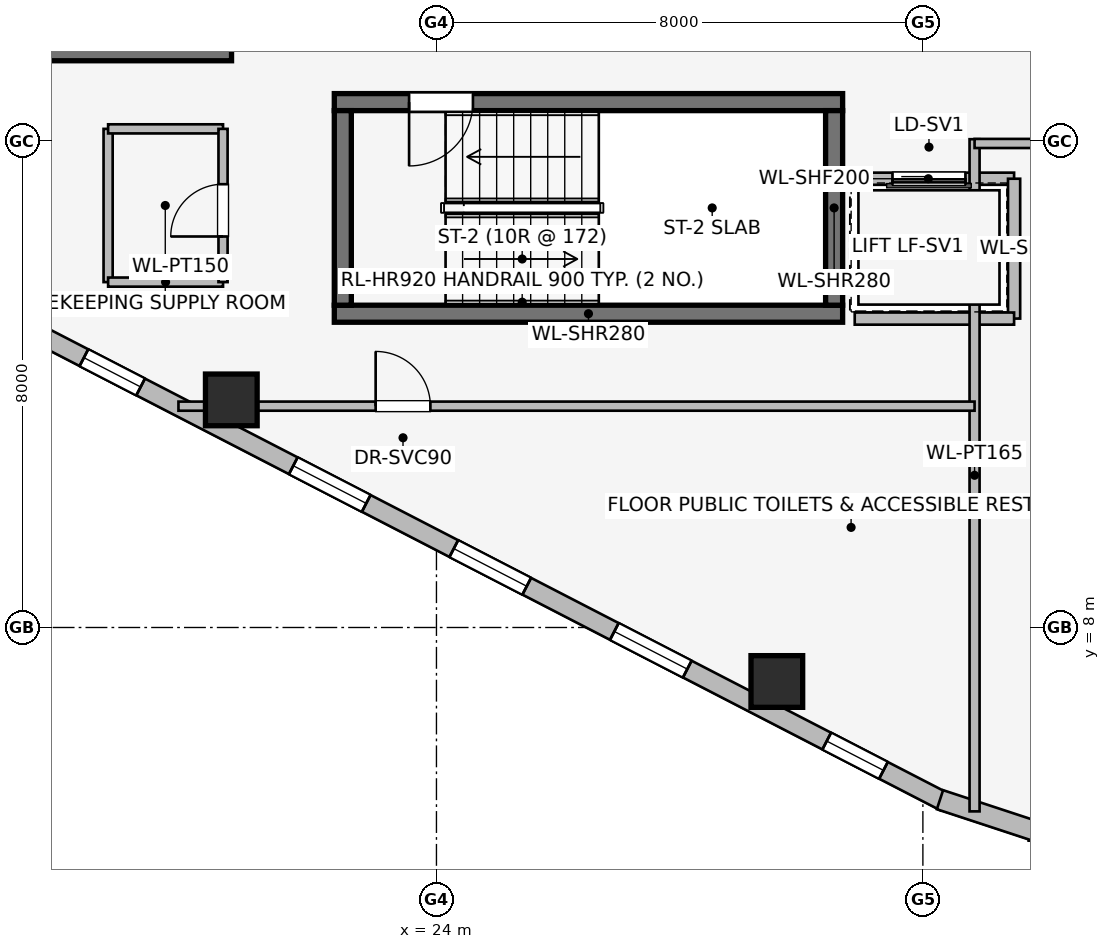
"""IFC4 building model, lengths in metres.
Left out: names, types, materials, properties, quantities, classifications, styles, units other than length and angle.
Written with IfcOpenShell. Run it as: python <this file> out.ifc"""

import sys

from ifc_helpers import new_model, si_unit, direction, frame, frame_2d, origin, origin_2d, place, context, subcontext, project, spatial, rectangle, extrude, element, fill, save


model = new_model("IFC4")
c1 = context("Model", 3, precision=1e-05, world=origin(), true_north=direction((0.0, 1.0)))
c2 = subcontext(c1, "Body", "Model", "MODEL_VIEW")
j1 = project(units=[si_unit("LENGTHUNIT", "METRE"), si_unit("PLANEANGLEUNIT", "RADIAN")], contexts=[c1])
p1 = place(None, origin())
s1 = spatial("IfcSite", under=j1, at=p1, CompositionType="ELEMENT")
p2 = place(p1, origin())
s2 = spatial("IfcBuilding", under=s1, at=p2, CompositionType="ELEMENT")
p3 = place(p2, frame((0.0, 0.0, 170.55)))
s3 = spatial("IfcBuildingStorey", under=s2, at=p3, CompositionType="ELEMENT", Elevation=170.55)
p4 = place(p3, frame((16.87, 17.46, 0.0), z_axis=(0.0, 0.0, 1.0), x_axis=(1.0, 0.0, 0.0)))
e1 = element("IfcWall", 1, at=p4, inside=s3, PredefinedType="SHEAR", context=c2, shape_type="SweptSolid", body=[
    extrude(rectangle(XDim=3.76, YDim=0.28, at=frame_2d((1.88, 0.0))), origin(), (0.0, 0.0, 1.0), 3.45),
])
p5 = place(p3, frame((22.32, 13.16, 0.0), z_axis=(0.0, 0.0, 1.0), x_axis=(1.0, 0.0, 0.0)))
e2 = element("IfcWall", 2, at=p5, inside=s3, PredefinedType="SHEAR", context=c2, shape_type="SweptSolid", body=[
    extrude(rectangle(XDim=8.36, YDim=0.28, at=frame_2d((4.18, 0.0))), origin(), (0.0, 0.0, 1.0), 3.45),
])
p6 = place(p3, frame((30.68, 16.64, 0.0), z_axis=(0.0, 0.0, 1.0), x_axis=(-1.0, 0.0, 0.0)))
e3 = element("IfcWall", 3, at=p6, inside=s3, PredefinedType="SHEAR", context=c2, shape_type="SweptSolid", body=[
    extrude(rectangle(XDim=8.36, YDim=0.28, at=frame_2d((4.18, 0.0))), origin(), (0.0, 0.0, 1.0), 3.45),
])
p7 = place(p6, frame((6.08, 0.0, 0.0)))
e4 = element("IfcOpeningElement", 4, at=p7, cuts=e3, PredefinedType="OPENING", context=c2, shape_type="SweptSolid", body=[
    extrude(rectangle(XDim=1.05, YDim=2.0, at=frame_2d((0.525, 1.0))), frame((0.0, 0.15, 0.0), z_axis=(0.0, -1.0, 0.0), x_axis=(1.0, 0.0, 0.0)), (0.0, 0.0, 1.0), 0.3),
])
for number, where, z_axis, x_axis in (
    (5, (22.46, 16.5, 0.0), (0.0, 0.0, 1.0), (0.0, -1.0, 0.0)),
    (6, (30.54, 13.3, 0.0), (0.0, 0.0, 1.0), (0.0, 1.0, 0.0)),
):
    element("IfcWall", number, at=place(p3, frame(where, z_axis=z_axis, x_axis=x_axis)), inside=s3, PredefinedType="SHEAR", context=c2, shape_type="SweptSolid", body=[
        extrude(rectangle(XDim=3.2, YDim=0.28, at=frame_2d((1.6, 0.0))), origin(), (0.0, 0.0, 1.0), 3.45),
    ])
for number, where, z_axis, x_axis in (
    (7, (20.626, 11.743, 0.0), (0.0, 0.0, 1.0), (1.0, 0.0, 0.0)),
    (8, (29.598, 7.112, 0.0), (0.0, 0.0, 1.0), (1.0, 0.0, 0.0)),
):
    element("IfcColumn", number, at=place(p3, frame(where, z_axis=z_axis, x_axis=x_axis)), inside=s3, PredefinedType="COLUMN", context=c2, shape_type="SweptSolid", body=[
        extrude(rectangle(XDim=0.85, YDim=0.85, at=origin_2d()), origin(), (0.0, 0.0, 1.0), 3.45),
    ])
p8 = place(p3, frame((32.362, 5.129, 0.0), z_axis=(0.0, 0.0, 1.0), x_axis=(-0.888626188278, 0.458632202867, 0.0)))
e9 = element("IfcWall", 9, at=p8, inside=s3, PredefinedType="STANDARD", context=c2, shape_type="SweptSolid", body=[
    extrude(rectangle(XDim=16.828, YDim=0.31, at=frame_2d((8.414, 0.0))), origin(), (0.0, 0.0, 1.0), 3.16),
])
p9 = place(p8, frame((1.137, 0.0, 0.75)))
e10 = element("IfcOpeningElement", 10, at=p9, cuts=e9, PredefinedType="OPENING", context=c2, shape_type="SweptSolid", body=[
    extrude(rectangle(XDim=1.05, YDim=1.4, at=frame_2d((0.525, 0.7))), frame((0.0, 0.165, 0.0), z_axis=(0.0, -1.0, 0.0), x_axis=(1.0, 0.0, 0.0)), (0.0, 0.0, 1.0), 0.33),
])
p10 = place(p8, frame((4.768, 0.0, 0.75)))
e11 = element("IfcOpeningElement", 11, at=p10, cuts=e9, PredefinedType="OPENING", context=c2, shape_type="SweptSolid", body=[
    extrude(rectangle(XDim=1.35, YDim=1.45, at=frame_2d((0.675, 0.725))), frame((0.0, 0.165, 0.0), z_axis=(0.0, -1.0, 0.0), x_axis=(1.0, 0.0, 0.0)), (0.0, 0.0, 1.0), 0.33),
])
p11 = place(p8, frame((7.739, 0.0, 0.75)))
e12 = element("IfcOpeningElement", 12, at=p11, cuts=e9, PredefinedType="OPENING", context=c2, shape_type="SweptSolid", body=[
    extrude(rectangle(XDim=1.35, YDim=1.45, at=frame_2d((0.675, 0.725))), frame((0.0, 0.165, 0.0), z_axis=(0.0, -1.0, 0.0), x_axis=(1.0, 0.0, 0.0)), (0.0, 0.0, 1.0), 0.33),
])
p12 = place(p8, frame((10.71, 0.0, 0.75)))
e13 = element("IfcOpeningElement", 13, at=p12, cuts=e9, PredefinedType="OPENING", context=c2, shape_type="SweptSolid", body=[
    extrude(rectangle(XDim=1.35, YDim=1.45, at=frame_2d((0.675, 0.725))), frame((0.0, 0.165, 0.0), z_axis=(0.0, -1.0, 0.0), x_axis=(1.0, 0.0, 0.0)), (0.0, 0.0, 1.0), 0.33),
])
p13 = place(p8, frame((14.885, 0.0, 0.75)))
e14 = element("IfcOpeningElement", 14, at=p13, cuts=e9, PredefinedType="OPENING", context=c2, shape_type="SweptSolid", body=[
    extrude(rectangle(XDim=1.05, YDim=1.4, at=frame_2d((0.525, 0.7))), frame((0.0, 0.165, 0.0), z_axis=(0.0, -1.0, 0.0), x_axis=(1.0, 0.0, 0.0)), (0.0, 0.0, 1.0), 0.33),
])
p14 = place(p3, frame((35.461, 4.659, 0.0), z_axis=(0.0, 0.0, 1.0), x_axis=(-1.0, 0.0, 0.0)))
e15 = element("IfcWall", 15, at=p14, inside=s3, PredefinedType="STANDARD", context=c2, shape_type="SweptSolid", body=[
    extrude(rectangle(XDim=1.722, YDim=0.33, at=frame_2d((0.861, 0.0))), origin(), (0.0, 0.0, 1.0), 3.16),
])
p15 = place(p3, frame((33.917, 4.63, 0.0), z_axis=(0.0, 0.0, 1.0), x_axis=(-0.949937416267, 0.312440242569, 0.0)))
e16 = element("IfcWall", 16, at=p15, inside=s3, PredefinedType="STANDARD", context=c2, shape_type="SweptSolid", body=[
    extrude(rectangle(XDim=1.722, YDim=0.33, at=frame_2d((0.861, 0.0))), origin(), (0.0, 0.0, 1.0), 3.16),
])
p16 = place(p3, frame((33.5, 15.38, 0.0), z_axis=(0.0, 0.0, 1.0), x_axis=(-1.0, 0.0, 0.0)))
e17 = element("IfcWall", 17, at=p16, inside=s3, PredefinedType="PARTITIONING", context=c2, shape_type="SweptSolid", body=[
    extrude(rectangle(XDim=2.82, YDim=0.2, at=frame_2d((1.41, 0.0))), origin(), (0.0, 0.0, 1.0), 3.16),
])
p17 = place(p16, frame((0.8, 0.0, 0.0)))
e18 = element("IfcOpeningElement", 18, at=p17, cuts=e17, PredefinedType="OPENING", context=c2, shape_type="SweptSolid", body=[
    extrude(rectangle(XDim=1.2, YDim=2.2, at=frame_2d((0.6, 1.1))), frame((0.0, 0.11, 0.0), z_axis=(0.0, -1.0, 0.0), x_axis=(1.0, 0.0, 0.0)), (0.0, 0.0, 1.0), 0.22),
])
p18 = place(p3, frame((33.5, 13.08, 0.0), z_axis=(0.0, 0.0, 1.0), x_axis=(0.0, 1.0, 0.0)))
e19 = element("IfcWall", 19, at=p18, inside=s3, PredefinedType="PARTITIONING", context=c2, shape_type="SweptSolid", body=[
    extrude(rectangle(XDim=2.3, YDim=0.2, at=frame_2d((1.15, 0.0))), origin(), (0.0, 0.0, 1.0), 3.16),
])
p19 = place(p3, frame((30.879, 13.08, 0.0), z_axis=(0.0, 0.0, 1.0), x_axis=(1.0, 0.0, 0.0)))
e20 = element("IfcWall", 20, at=p19, inside=s3, PredefinedType="PARTITIONING", context=c2, shape_type="SweptSolid", body=[
    extrude(rectangle(XDim=2.621, YDim=0.2, at=frame_2d((1.311, 0.0))), origin(), (0.0, 0.0, 1.0), 3.16),
])
p20 = place(p3, frame((18.6, 16.2, 0.0), z_axis=(0.0, 0.0, 1.0), x_axis=(0.0, -1.0, 0.0)))
e21 = element("IfcWall", 21, at=p20, inside=s3, PredefinedType="PARTITIONING", context=c2, shape_type="SweptSolid", body=[
    extrude(rectangle(XDim=2.52, YDim=0.15, at=frame_2d((1.26, 0.0))), origin(), (0.0, 0.0, 1.0), 3.16),
])
for number, where, z_axis, x_axis in (
    (22, (18.6, 13.68, 0.0), (0.0, 0.0, 1.0), (1.0, 0.0, 0.0)),
    (23, (18.6, 16.2, 0.0), (0.0, 0.0, 1.0), (1.0, 0.0, 0.0)),
):
    element("IfcWall", number, at=place(p3, frame(where, z_axis=z_axis, x_axis=x_axis)), inside=s3, PredefinedType="PARTITIONING", context=c2, shape_type="SweptSolid", body=[
        extrude(rectangle(XDim=1.89, YDim=0.15, at=frame_2d((0.945, 0.0))), origin(), (0.0, 0.0, 1.0), 3.16),
    ])
p21 = place(p3, frame((20.49, 13.68, 0.0), z_axis=(0.0, 0.0, 1.0), x_axis=(0.0, 1.0, 0.0)))
e24 = element("IfcWall", 24, at=p21, inside=s3, PredefinedType="PARTITIONING", context=c2, shape_type="SweptSolid", body=[
    extrude(rectangle(XDim=2.52, YDim=0.15, at=frame_2d((1.26, 0.0))), origin(), (0.0, 0.0, 1.0), 3.16),
])
p22 = place(p21, frame((0.75, 0.0, 0.0)))
e25 = element("IfcOpeningElement", 25, at=p22, cuts=e24, PredefinedType="OPENING", context=c2, shape_type="SweptSolid", body=[
    extrude(rectangle(XDim=0.86, YDim=2.0, at=frame_2d((0.43, 1.0))), frame((0.0, 0.085, 0.0), z_axis=(0.0, -1.0, 0.0), x_axis=(1.0, 0.0, 0.0)), (0.0, 0.0, 1.0), 0.17),
])
p23 = place(p3, frame((32.85, 4.976, 0.0), z_axis=(0.0, 0.0, 1.0), x_axis=(0.0, 1.0, 0.0)))
e26 = element("IfcWall", 26, at=p23, inside=s3, PredefinedType="PARTITIONING", context=c2, shape_type="SweptSolid", body=[
    extrude(rectangle(XDim=11.054, YDim=0.165, at=frame_2d((5.527, 0.0))), origin(), (0.0, 0.0, 1.0), 3.16),
])
p24 = place(p3, frame((19.757, 11.64, 0.0), z_axis=(0.0, 0.0, 1.0), x_axis=(1.0, 0.0, 0.0)))
e27 = element("IfcWall", 27, at=p24, inside=s3, PredefinedType="PARTITIONING", context=c2, shape_type="SweptSolid", body=[
    extrude(rectangle(XDim=13.093, YDim=0.15, at=frame_2d((6.546, 0.0))), origin(), (0.0, 0.0, 1.0), 3.16),
])
p25 = place(p24, frame((3.243, 0.0, 0.0)))
e28 = element("IfcOpeningElement", 28, at=p25, cuts=e27, PredefinedType="OPENING", context=c2, shape_type="SweptSolid", body=[
    extrude(rectangle(XDim=0.9, YDim=2.0, at=frame_2d((0.45, 1.0))), frame((0.0, 0.085, 0.0), z_axis=(0.0, -1.0, 0.0), x_axis=(1.0, 0.0, 0.0)), (0.0, 0.0, 1.0), 0.17),
])
p26 = place(p3, frame((32.85, 15.96, 0.0), z_axis=(0.0, 0.0, 1.0), x_axis=(1.0, 0.0, 0.0)))
e29 = element("IfcWall", 29, at=p26, inside=s3, PredefinedType="PARTITIONING", context=c2, shape_type="SweptSolid", body=[
    extrude(rectangle(XDim=4.664, YDim=0.15, at=frame_2d((2.332, 0.0))), origin(), (0.0, 0.0, 1.0), 3.16),
])
p27 = place(p26, frame((1.852, 0.0, 0.0)))
e30 = element("IfcOpeningElement", 30, at=p27, cuts=e29, PredefinedType="OPENING", context=c2, shape_type="SweptSolid", body=[
    extrude(rectangle(XDim=0.96, YDim=2.0, at=frame_2d((0.48, 1.0))), frame((0.0, 0.085, 0.0), z_axis=(0.0, -1.0, 0.0), x_axis=(1.0, 0.0, 0.0)), (0.0, 0.0, 1.0), 0.17),
])
p28 = place(p9, origin())
e31 = element("IfcWindow", 31, at=p28, inside=s3, PartitioningType="SINGLE_PANEL", PredefinedType="WINDOW", context=c2, shape_type="SweptSolid", body=[
    extrude(rectangle(XDim=1.05, YDim=1.4, at=frame_2d((0.525, 0.7))), frame((0.0, 0.03, 0.0), z_axis=(0.0, -1.0, 0.0), x_axis=(1.0, 0.0, 0.0)), (0.0, 0.0, 1.0), 0.06),
])
fill(e10, e31)
p29 = place(p10, origin())
e32 = element("IfcWindow", 32, at=p29, inside=s3, PartitioningType="SINGLE_PANEL", PredefinedType="WINDOW", context=c2, shape_type="SweptSolid", body=[
    extrude(rectangle(XDim=1.35, YDim=1.45, at=frame_2d((0.675, 0.725))), frame((0.0, 0.03, 0.0), z_axis=(0.0, -1.0, 0.0), x_axis=(1.0, 0.0, 0.0)), (0.0, 0.0, 1.0), 0.06),
])
fill(e11, e32)
p30 = place(p11, origin())
e33 = element("IfcWindow", 33, at=p30, inside=s3, PartitioningType="SINGLE_PANEL", PredefinedType="WINDOW", context=c2, shape_type="SweptSolid", body=[
    extrude(rectangle(XDim=1.35, YDim=1.45, at=frame_2d((0.675, 0.725))), frame((0.0, 0.03, 0.0), z_axis=(0.0, -1.0, 0.0), x_axis=(1.0, 0.0, 0.0)), (0.0, 0.0, 1.0), 0.06),
])
fill(e12, e33)
p31 = place(p12, origin())
e34 = element("IfcWindow", 34, at=p31, inside=s3, PartitioningType="SINGLE_PANEL", PredefinedType="WINDOW", context=c2, shape_type="SweptSolid", body=[
    extrude(rectangle(XDim=1.35, YDim=1.45, at=frame_2d((0.675, 0.725))), frame((0.0, 0.03, 0.0), z_axis=(0.0, -1.0, 0.0), x_axis=(1.0, 0.0, 0.0)), (0.0, 0.0, 1.0), 0.06),
])
fill(e13, e34)
p32 = place(p13, origin())
e35 = element("IfcWindow", 35, at=p32, inside=s3, PartitioningType="SINGLE_PANEL", PredefinedType="WINDOW", context=c2, shape_type="SweptSolid", body=[
    extrude(rectangle(XDim=1.05, YDim=1.4, at=frame_2d((0.525, 0.7))), frame((0.0, 0.03, 0.0), z_axis=(0.0, -1.0, 0.0), x_axis=(1.0, 0.0, 0.0)), (0.0, 0.0, 1.0), 0.06),
])
fill(e14, e35)
p33 = place(p7, origin())
e36 = element("IfcDoor", 36, at=p33, inside=s3, OperationType="SINGLE_SWING_RIGHT", PredefinedType="DOOR", context=c2, shape_type="SweptSolid", body=[
    extrude(rectangle(XDim=1.05, YDim=2.0, at=frame_2d((0.525, 1.0))), frame((0.0, 0.025, 0.0), z_axis=(0.0, -1.0, 0.0), x_axis=(1.0, 0.0, 0.0)), (0.0, 0.0, 1.0), 0.05),
])
fill(e4, e36)
p34 = place(p17, origin())
e37 = element("IfcDoor", 37, at=p34, inside=s3, OperationType="SLIDING_TO_RIGHT", PredefinedType="DOOR", context=c2, shape_type="SweptSolid", body=[
    extrude(rectangle(XDim=1.2, YDim=2.2, at=frame_2d((0.6, 1.1))), frame((0.0, 0.025, 0.0), z_axis=(0.0, -1.0, 0.0), x_axis=(1.0, 0.0, 0.0)), (0.0, 0.0, 1.0), 0.05),
])
fill(e18, e37)
p35 = place(p22, origin())
e38 = element("IfcDoor", 38, at=p35, inside=s3, OperationType="SINGLE_SWING_LEFT", PredefinedType="DOOR", context=c2, shape_type="SweptSolid", body=[
    extrude(rectangle(XDim=0.86, YDim=2.0, at=frame_2d((0.43, 1.0))), frame((0.0, 0.025, 0.0), z_axis=(0.0, -1.0, 0.0), x_axis=(1.0, 0.0, 0.0)), (0.0, 0.0, 1.0), 0.05),
])
fill(e25, e38)
p36 = place(p25, origin())
e39 = element("IfcDoor", 39, at=p36, inside=s3, OperationType="SINGLE_SWING_LEFT", PredefinedType="DOOR", context=c2, shape_type="SweptSolid", body=[
    extrude(rectangle(XDim=0.9, YDim=2.0, at=frame_2d((0.45, 1.0))), frame((0.0, 0.025, 0.0), z_axis=(0.0, -1.0, 0.0), x_axis=(1.0, 0.0, 0.0)), (0.0, 0.0, 1.0), 0.05),
])
fill(e28, e39)
save(model, sys.argv[1])
